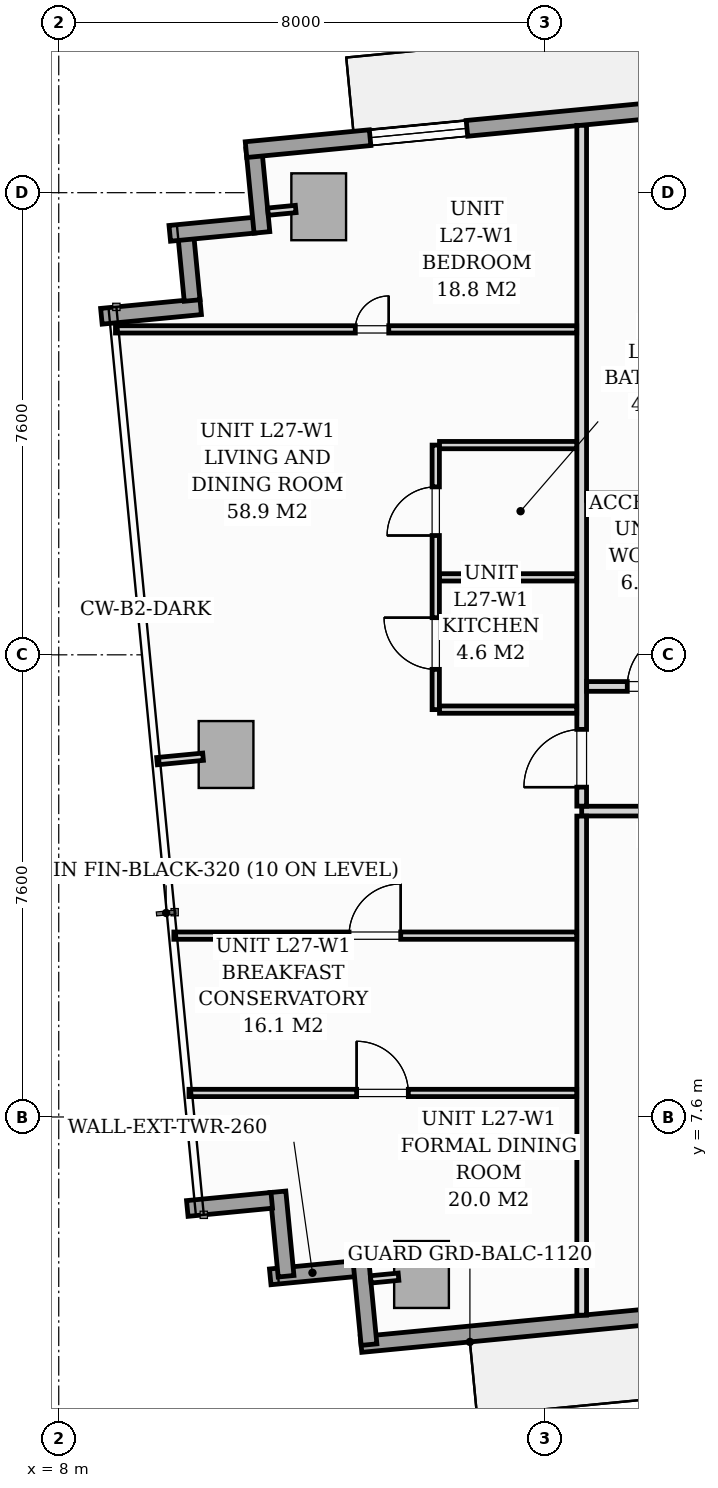
"""IFC4 building model, lengths in metres.
Left out: names, types, materials, properties, quantities, classifications, styles, units other than length and angle.
Written with IfcOpenShell. Run it as: python <this file> out.ifc"""

import sys

from ifc_helpers import new_model, si_unit, direction, frame, frame_2d, origin, origin_2d, place, context, subcontext, project, spatial, rectangle, extrude, source, transform, mapped, element, fill, save


model = new_model("IFC4")
c1 = context("Model", 3, precision=1e-05, world=origin(), true_north=direction((0.0, 1.0)))
c2 = subcontext(c1, "Body", "Model", "MODEL_VIEW")
j1 = project(units=[si_unit("LENGTHUNIT", "METRE"), si_unit("PLANEANGLEUNIT", "RADIAN")], contexts=[c1])
p1 = place(None, origin())
s1 = spatial("IfcSite", under=j1, at=p1, CompositionType="ELEMENT")
p2 = place(p1, origin())
s2 = spatial("IfcBuilding", under=s1, at=p2, CompositionType="ELEMENT")
p3 = place(p2, frame((0.0, 0.0, 97.0)))
s3 = spatial("IfcBuildingStorey", under=s2, at=p3, CompositionType="ELEMENT", Elevation=97.0)
m1 = source(origin(), c2, "Body", "SweptSolid", [
    extrude(rectangle(XDim=0.9, YDim=1.1, at=origin_2d()), origin(), (0.0, 0.0, 1.0), 3.196),
])
for number, where, z_axis, x_axis in (
    (1, (13.966, 5.01, 0.002), (0.0, 0.0, 1.0), (0.995, 0.096, 0.0)),
    (2, (12.275, 22.568, 0.002), (0.0, 0.0, 1.0), (0.995, 0.096, 0.0)),
    (3, (10.752, 13.561, 0.002), (0.0, 0.0, 1.0), (0.995, 0.096, 0.0)),
):
    element("IfcColumn", number, at=place(p3, frame(where, z_axis=z_axis, x_axis=x_axis)), inside=s3, PredefinedType="COLUMN", context=c2, shape_type="MappedRepresentation", body=[
        mapped(m1, transform((0.0, 0.0, 0.0), scale=1.0)),
    ])
for number, where, z_axis, x_axis in (
    (4, (12.867, 5.104, 0.0), (0.0, 0.0, 1.0), (-0.995, -0.096, 0.0)),
    (5, (11.739, 4.981, 0.0), (0.0, 0.0, 1.0), (-0.096, 0.995, 0.0)),
):
    element("IfcWall", number, at=place(p3, frame(where, z_axis=z_axis, x_axis=x_axis)), inside=s3, PredefinedType="STANDARD", context=c2, shape_type="SweptSolid", body=[
        extrude(rectangle(XDim=1.395, YDim=0.26, at=frame_2d((0.697, 0.0))), origin(), (0.0, 0.0, 1.0), 2.94),
    ])
p4 = place(p3, frame((11.503, 6.229, 0.0), z_axis=(0.0, 0.0, 1.0), x_axis=(-0.995391056452, -0.09589913835, 0.0)))
e6 = element("IfcWall", 6, at=p4, inside=s3, PredefinedType="STANDARD", context=c2, shape_type="SweptSolid", body=[
    extrude(rectangle(XDim=1.395, YDim=0.26, at=frame_2d((0.698, 0.0))), origin(), (0.0, 0.0, 1.0), 2.94),
])
p5 = place(p3, frame((8.701, 20.767, 0.0), z_axis=(0.0, 0.0, 1.0), x_axis=(0.995394563142, 0.095862733462, 0.0)))
e7 = element("IfcWall", 7, at=p5, inside=s3, PredefinedType="STANDARD", context=c2, shape_type="SweptSolid", body=[
    extrude(rectangle(XDim=1.64, YDim=0.26, at=frame_2d((0.82, 0.0))), origin(), (0.0, 0.0, 1.0), 2.94),
])
p6 = place(p3, frame((10.193, 21.027, 0.0), z_axis=(0.0, 0.0, 1.0), x_axis=(-0.095740721699, 0.995406306092, 0.0)))
e8 = element("IfcWall", 8, at=p6, inside=s3, PredefinedType="STANDARD", context=c2, shape_type="SweptSolid", body=[
    extrude(rectangle(XDim=1.15, YDim=0.26, at=frame_2d((0.575, 0.0))), origin(), (0.0, 0.0, 1.0), 2.94),
])
p7 = place(p3, frame((9.826, 22.131, 0.0), z_axis=(0.0, 0.0, 1.0), x_axis=(0.995389446633, 0.095915846097, 0.0)))
e9 = element("IfcWall", 9, at=p7, inside=s3, PredefinedType="STANDARD", context=c2, shape_type="SweptSolid", body=[
    extrude(rectangle(XDim=1.395, YDim=0.26, at=frame_2d((0.697, 0.0))), origin(), (0.0, 0.0, 1.0), 2.94),
])
p8 = place(p3, frame((11.341, 22.147, 0.0), z_axis=(0.0, 0.0, 1.0), x_axis=(-0.09589913835, 0.995391056452, 0.0)))
e10 = element("IfcWall", 10, at=p8, inside=s3, PredefinedType="STANDARD", context=c2, shape_type="SweptSolid", body=[
    extrude(rectangle(XDim=1.395, YDim=0.26, at=frame_2d((0.698, 0.0))), origin(), (0.0, 0.0, 1.0), 2.94),
])
p9 = place(p3, frame((11.08, 23.508, 0.0), z_axis=(0.0, 0.0, 1.0), x_axis=(0.995396638587, 0.095841180552, 0.0)))
e11 = element("IfcWall", 11, at=p9, inside=s3, PredefinedType="STANDARD", context=c2, shape_type="SweptSolid", body=[
    extrude(rectangle(XDim=19.11, YDim=0.26, at=frame_2d((9.555, 0.0))), origin(), (0.0, 0.0, 1.0), 2.94),
])
p10 = place(p9, frame((7.726, 0.0, 0.0)))
e12 = element("IfcOpeningElement", 12, at=p10, cuts=e11, PredefinedType="OPENING", context=c2, shape_type="SweptSolid", body=[
    extrude(rectangle(XDim=1.8, YDim=2.06, at=frame_2d((0.9, 1.03))), frame((0.0, 0.14, 0.0), z_axis=(0.0, -1.0, 0.0), x_axis=(1.0, 0.0, 0.0)), (0.0, 0.0, 1.0), 0.28),
])
p11 = place(p9, frame((2.05, 0.0, 0.65)))
e13 = element("IfcOpeningElement", 13, at=p11, cuts=e11, PredefinedType="OPENING", context=c2, shape_type="SweptSolid", body=[
    extrude(rectangle(XDim=1.6, YDim=1.5, at=frame_2d((0.8, 0.75))), frame((0.0, 0.14, 0.0), z_axis=(0.0, -1.0, 0.0), x_axis=(1.0, 0.0, 0.0)), (0.0, 0.0, 1.0), 0.28),
])
p12 = place(p3, frame((31.994, 5.69, 0.0), z_axis=(0.0, 0.0, 1.0), x_axis=(-0.995396521236, -0.095842399342, 0.0)))
e14 = element("IfcWall", 14, at=p12, inside=s3, PredefinedType="STANDARD", context=c2, shape_type="SweptSolid", body=[
    extrude(rectangle(XDim=19.11, YDim=0.26, at=frame_2d((9.555, 0.0))), origin(), (0.0, 0.0, 1.0), 2.94),
])
p13 = place(p12, frame((7.91, 0.0, 0.0)))
e15 = element("IfcOpeningElement", 15, at=p13, cuts=e14, PredefinedType="OPENING", context=c2, shape_type="SweptSolid", body=[
    extrude(rectangle(XDim=1.8, YDim=2.06, at=frame_2d((0.9, 1.03))), frame((0.0, 0.14, 0.0), z_axis=(0.0, -1.0, 0.0), x_axis=(1.0, 0.0, 0.0)), (0.0, 0.0, 1.0), 0.28),
])
p14 = place(p12, frame((0.7, 0.0, 0.65)))
e16 = element("IfcOpeningElement", 16, at=p14, cuts=e14, PredefinedType="OPENING", context=c2, shape_type="SweptSolid", body=[
    extrude(rectangle(XDim=1.6, YDim=1.5, at=frame_2d((0.8, 0.75))), frame((0.0, 0.14, 0.0), z_axis=(0.0, -1.0, 0.0), x_axis=(1.0, 0.0, 0.0)), (0.0, 0.0, 1.0), 0.28),
])
p15 = place(p12, frame((5.167, 0.0, 0.75)))
e17 = element("IfcOpeningElement", 17, at=p15, cuts=e14, PredefinedType="OPENING", context=c2, shape_type="SweptSolid", body=[
    extrude(rectangle(XDim=1.6, YDim=1.5, at=frame_2d((0.8, 0.75))), frame((0.0, 0.14, 0.0), z_axis=(0.0, -1.0, 0.0), x_axis=(1.0, 0.0, 0.0)), (0.0, 0.0, 1.0), 0.28),
])
p16 = place(p3, frame((13.103, 3.856, 0.0), z_axis=(0.0, 0.0, 1.0), x_axis=(-0.09589913835, 0.995391056452, 0.0)))
e18 = element("IfcWall", 18, at=p16, inside=s3, PredefinedType="STANDARD", context=c2, shape_type="SweptSolid", body=[
    extrude(rectangle(XDim=1.395, YDim=0.26, at=frame_2d((0.698, 0.0))), origin(), (0.0, 0.0, 1.0), 2.94),
])
p17 = place(p3, frame((16.6, 12.63, 0.0), z_axis=(0.0, 0.0, 1.0), x_axis=(1.0, 0.0, 0.0)))
e19 = element("IfcWall", 19, at=p17, inside=s3, PredefinedType="PARTITIONING", context=c2, shape_type="SweptSolid", body=[
    extrude(rectangle(XDim=37.6, YDim=0.16, at=frame_2d((18.8, 0.0))), origin(), (0.0, 0.0, 1.0), 2.94),
])
p18 = place(p17, frame((1.626, 0.0, 0.0)))
e20 = element("IfcOpeningElement", 20, at=p18, cuts=e19, PredefinedType="OPENING", context=c2, shape_type="SweptSolid", body=[
    extrude(rectangle(XDim=0.95, YDim=2.06, at=frame_2d((0.475, 1.03))), frame((0.0, 0.09, 0.0), z_axis=(0.0, -1.0, 0.0), x_axis=(1.0, 0.0, 0.0)), (0.0, 0.0, 1.0), 0.18),
])
p19 = place(p17, frame((13.46, 0.0, 0.0)))
e21 = element("IfcOpeningElement", 21, at=p19, cuts=e19, PredefinedType="OPENING", context=c2, shape_type="SweptSolid", body=[
    extrude(rectangle(XDim=0.95, YDim=2.06, at=frame_2d((0.475, 1.03))), frame((0.0, 0.09, 0.0), z_axis=(0.0, -1.0, 0.0), x_axis=(1.0, 0.0, 0.0)), (0.0, 0.0, 1.0), 0.18),
])
p20 = place(p17, frame((26.522, 0.0, 0.0)))
e22 = element("IfcOpeningElement", 22, at=p20, cuts=e19, PredefinedType="OPENING", context=c2, shape_type="SweptSolid", body=[
    extrude(rectangle(XDim=0.95, YDim=2.06, at=frame_2d((0.475, 1.03))), frame((0.0, 0.09, 0.0), z_axis=(0.0, -1.0, 0.0), x_axis=(1.0, 0.0, 0.0)), (0.0, 0.0, 1.0), 0.18),
])
p21 = place(p3, frame((16.6, 4.341, 0.0), z_axis=(0.0, 0.0, 1.0), x_axis=(0.0, 1.0, 0.0)))
e23 = element("IfcWall", 23, at=p21, inside=s3, PredefinedType="PARTITIONING", context=c2, shape_type="SweptSolid", body=[
    extrude(rectangle(XDim=8.207, YDim=0.16, at=frame_2d((4.104, 0.0))), origin(), (0.0, 0.0, 1.0), 2.94),
])
p22 = place(p3, frame((16.6, 12.712, 0.0), z_axis=(0.0, 0.0, 1.0), x_axis=(0.0, 1.0, 0.0)))
e24 = element("IfcWall", 24, at=p22, inside=s3, PredefinedType="PARTITIONING", context=c2, shape_type="SweptSolid", body=[
    extrude(rectangle(XDim=11.195, YDim=0.16, at=frame_2d((5.598, 0.0))), origin(), (0.0, 0.0, 1.0), 2.94),
])
p23 = place(p22, frame((0.312, 0.0, 0.0)))
e25 = element("IfcOpeningElement", 25, at=p23, cuts=e24, PredefinedType="OPENING", context=c2, shape_type="SweptSolid", body=[
    extrude(rectangle(XDim=0.95, YDim=2.06, at=frame_2d((0.475, 1.03))), frame((0.0, 0.09, 0.0), z_axis=(0.0, -1.0, 0.0), x_axis=(1.0, 0.0, 0.0)), (0.0, 0.0, 1.0), 0.18),
])
p24 = place(p3, frame((14.2, 14.299, 0.0), z_axis=(0.0, 0.0, 1.0), x_axis=(0.0, 1.0, 0.0)))
e26 = element("IfcWall", 26, at=p24, inside=s3, PredefinedType="PARTITIONING", context=c2, shape_type="SweptSolid", body=[
    extrude(rectangle(XDim=4.35, YDim=0.12, at=frame_2d((2.175, 0.0))), origin(), (0.0, 0.0, 1.0), 2.94),
])
p25 = place(p24, frame((0.662, 0.0, 0.0)))
e27 = element("IfcOpeningElement", 27, at=p25, cuts=e26, PredefinedType="OPENING", context=c2, shape_type="SweptSolid", body=[
    extrude(rectangle(XDim=0.85, YDim=2.05, at=frame_2d((0.425, 1.025))), frame((0.0, 0.07, 0.0), z_axis=(0.0, -1.0, 0.0), x_axis=(1.0, 0.0, 0.0)), (0.0, 0.0, 1.0), 0.14),
])
p26 = place(p24, frame((2.863, 0.0, 0.0)))
e28 = element("IfcOpeningElement", 28, at=p26, cuts=e26, PredefinedType="OPENING", context=c2, shape_type="SweptSolid", body=[
    extrude(rectangle(XDim=0.8, YDim=2.02, at=frame_2d((0.4, 1.01))), frame((0.0, 0.07, 0.0), z_axis=(0.0, -1.0, 0.0), x_axis=(1.0, 0.0, 0.0)), (0.0, 0.0, 1.0), 0.14),
])
p27 = place(p3, frame((14.262, 16.474, 0.0), z_axis=(0.0, 0.0, 1.0), x_axis=(1.0, 0.0, 0.0)))
e29 = element("IfcWall", 29, at=p27, inside=s3, PredefinedType="PARTITIONING", context=c2, shape_type="SweptSolid", body=[
    extrude(rectangle(XDim=2.256, YDim=0.12, at=frame_2d((1.128, 0.0))), origin(), (0.0, 0.0, 1.0), 2.94),
])
p28 = place(p3, frame((14.262, 14.299, 0.0), z_axis=(0.0, 0.0, 1.0), x_axis=(1.0, 0.0, 0.0)))
e30 = element("IfcWall", 30, at=p28, inside=s3, PredefinedType="PARTITIONING", context=c2, shape_type="SweptSolid", body=[
    extrude(rectangle(XDim=2.256, YDim=0.12, at=frame_2d((1.128, 0.0))), origin(), (0.0, 0.0, 1.0), 2.063),
])
p29 = place(p3, frame((14.262, 18.649, 0.0), z_axis=(0.0, 0.0, 1.0), x_axis=(1.0, 0.0, 0.0)))
e31 = element("IfcWall", 31, at=p29, inside=s3, PredefinedType="PARTITIONING", context=c2, shape_type="SweptSolid", body=[
    extrude(rectangle(XDim=2.256, YDim=0.12, at=frame_2d((1.128, 0.0))), origin(), (0.0, 0.0, 1.0), 2.94),
])
p30 = place(p3, frame((8.933, 20.552, 0.0), z_axis=(0.0, 0.0, 1.0), x_axis=(1.0, 0.0, 0.0)))
e32 = element("IfcWall", 32, at=p30, inside=s3, PredefinedType="PARTITIONING", context=c2, shape_type="SweptSolid", body=[
    extrude(rectangle(XDim=7.585, YDim=0.12, at=frame_2d((3.792, 0.0))), origin(), (0.0, 0.0, 1.0), 2.94),
])
p31 = place(p30, frame((3.944, 0.0, 0.0)))
e33 = element("IfcOpeningElement", 33, at=p31, cuts=e32, PredefinedType="OPENING", context=c2, shape_type="SweptSolid", body=[
    extrude(rectangle(XDim=0.55, YDim=2.0, at=frame_2d((0.275, 1.0))), frame((0.0, 0.07, 0.0), z_axis=(0.0, -1.0, 0.0), x_axis=(1.0, 0.0, 0.0)), (0.0, 0.0, 1.0), 0.14),
])
p32 = place(p3, frame((10.142, 7.995, 0.0), z_axis=(0.0, 0.0, 1.0), x_axis=(1.0, 0.0, 0.0)))
e34 = element("IfcWall", 34, at=p32, inside=s3, PredefinedType="PARTITIONING", context=c2, shape_type="SweptSolid", body=[
    extrude(rectangle(XDim=6.376, YDim=0.12, at=frame_2d((3.188, 0.0))), origin(), (0.0, 0.0, 1.0), 2.94),
])
p33 = place(p32, frame((2.757, 0.0, 0.0)))
e35 = element("IfcOpeningElement", 35, at=p33, cuts=e34, PredefinedType="OPENING", context=c2, shape_type="SweptSolid", body=[
    extrude(rectangle(XDim=0.85, YDim=2.05, at=frame_2d((0.425, 1.025))), frame((0.0, 0.07, 0.0), z_axis=(0.0, -1.0, 0.0), x_axis=(1.0, 0.0, 0.0)), (0.0, 0.0, 1.0), 0.14),
])
p34 = place(p3, frame((9.893, 10.582, 0.0), z_axis=(0.0, 0.0, 1.0), x_axis=(1.0, 0.0, 0.0)))
e36 = element("IfcWall", 36, at=p34, inside=s3, PredefinedType="PARTITIONING", context=c2, shape_type="SweptSolid", body=[
    extrude(rectangle(XDim=6.625, YDim=0.12, at=frame_2d((3.312, 0.0))), origin(), (0.0, 0.0, 1.0), 2.94),
])
p35 = place(p34, frame((2.881, 0.0, 0.0)))
e37 = element("IfcOpeningElement", 37, at=p35, cuts=e36, PredefinedType="OPENING", context=c2, shape_type="SweptSolid", body=[
    extrude(rectangle(XDim=0.85, YDim=2.05, at=frame_2d((0.425, 1.025))), frame((0.0, 0.07, 0.0), z_axis=(0.0, -1.0, 0.0), x_axis=(1.0, 0.0, 0.0)), (0.0, 0.0, 1.0), 0.14),
])
p36 = place(p3, frame((16.682, 14.68, 0.0), z_axis=(0.0, 0.0, 1.0), x_axis=(1.0, 0.0, 0.0)))
e38 = element("IfcWall", 38, at=p36, inside=s3, PredefinedType="PARTITIONING", context=c2, shape_type="SweptSolid", body=[
    extrude(rectangle(XDim=9.478, YDim=0.16, at=frame_2d((4.739, 0.0))), origin(), (0.0, 0.0, 1.0), 2.94),
])
p37 = place(p36, frame((0.668, 0.0, 0.0)))
e39 = element("IfcOpeningElement", 39, at=p37, cuts=e38, PredefinedType="OPENING", context=c2, shape_type="SweptSolid", body=[
    extrude(rectangle(XDim=0.9, YDim=2.05, at=frame_2d((0.45, 1.025))), frame((0.0, 0.09, 0.0), z_axis=(0.0, -1.0, 0.0), x_axis=(1.0, 0.0, 0.0)), (0.0, 0.0, 1.0), 0.18),
])
p38 = place(p36, frame((5.363, 0.0, 0.0)))
e40 = element("IfcOpeningElement", 40, at=p38, cuts=e38, PredefinedType="OPENING", context=c2, shape_type="SweptSolid", body=[
    extrude(rectangle(XDim=0.95, YDim=2.06, at=frame_2d((0.475, 1.03))), frame((0.0, 0.09, 0.0), z_axis=(0.0, -1.0, 0.0), x_axis=(1.0, 0.0, 0.0)), (0.0, 0.0, 1.0), 0.18),
])
p39 = place(p3, frame((16.682, 17.8, 0.0), z_axis=(0.0, 0.0, 1.0), x_axis=(1.0, 0.0, 0.0)))
e41 = element("IfcWall", 41, at=p39, inside=s3, PredefinedType="PARTITIONING", context=c2, shape_type="SweptSolid", body=[
    extrude(rectangle(XDim=2.256, YDim=0.12, at=frame_2d((1.128, 0.0))), origin(), (0.0, 0.0, 1.0), 2.94),
])
for number, where, z_axis, x_axis in (
    (42, (13.588, 4.973, 0.0), (0.0, 0.0, 1.0), (-0.995, -0.095, 0.0)),
    (43, (11.897, 22.532, 0.0), (0.0, 0.0, 1.0), (-0.995, -0.096, 0.0)),
):
    element("IfcWall", number, at=place(p3, frame(where, z_axis=z_axis, x_axis=x_axis)), inside=s3, PredefinedType="PARTITIONING", context=c2, shape_type="SweptSolid", body=[
        extrude(rectangle(XDim=0.458, YDim=0.12, at=frame_2d((0.229, 0.0))), origin(), (0.0, 0.0, 1.0), 2.94),
    ])
p40 = place(p3, frame((10.373, 13.524, 0.0), z_axis=(0.0, 0.0, 1.0), x_axis=(-0.995377786728, -0.096036772582, 0.0)))
e44 = element("IfcWall", 44, at=p40, inside=s3, PredefinedType="PARTITIONING", context=c2, shape_type="SweptSolid", body=[
    extrude(rectangle(XDim=0.76, YDim=0.12, at=frame_2d((0.38, 0.0))), origin(), (0.0, 0.0, 1.0), 2.94),
])
m2 = source(origin(), c2, "Body", "SweptSolid", [
    extrude(rectangle(XDim=1.6, YDim=1.5, at=frame_2d((0.8, 0.75))), frame((0.0, 0.03, 0.0), z_axis=(0.0, -1.0, 0.0), x_axis=(1.0, 0.0, 0.0)), (0.0, 0.0, 1.0), 0.06),
])
p41 = place(p11, origin())
e45 = element("IfcWindow", 45, at=p41, inside=s3, PartitioningType="SINGLE_PANEL", PredefinedType="WINDOW", context=c2, shape_type="MappedRepresentation", body=[
    mapped(m2, transform((0.0, 0.0, 0.0), scale=1.0)),
])
fill(e13, e45)
m3 = source(origin(), c2, "Body", "SweptSolid", [
    extrude(rectangle(XDim=0.95, YDim=2.06, at=frame_2d((0.475, 1.03))), frame((0.0, 0.025, 0.0), z_axis=(0.0, -1.0, 0.0), x_axis=(1.0, 0.0, 0.0)), (0.0, 0.0, 1.0), 0.05),
])
p42 = place(p23, origin())
e46 = element("IfcDoor", 46, at=p42, inside=s3, OperationType="SINGLE_SWING_LEFT", PredefinedType="DOOR", context=c2, shape_type="MappedRepresentation", body=[
    mapped(m3, transform((0.0, 0.0, 0.0), scale=1.0)),
])
fill(e25, e46)
m4 = source(origin(), c2, "Body", "SweptSolid", [
    extrude(rectangle(XDim=0.85, YDim=2.05, at=frame_2d((0.425, 1.025))), frame((0.0, 0.025, 0.0), z_axis=(0.0, -1.0, 0.0), x_axis=(1.0, 0.0, 0.0)), (0.0, 0.0, 1.0), 0.05),
])
p43 = place(p25, origin())
e47 = element("IfcDoor", 47, at=p43, inside=s3, OperationType="SINGLE_SWING_RIGHT", PredefinedType="DOOR", context=c2, shape_type="MappedRepresentation", body=[
    mapped(m4, transform((0.0, 0.0, 0.0), scale=1.0)),
])
fill(e27, e47)
m5 = source(origin(), c2, "Body", "SweptSolid", [
    extrude(rectangle(XDim=0.8, YDim=2.02, at=frame_2d((0.4, 1.01))), frame((0.0, 0.025, 0.0), z_axis=(0.0, -1.0, 0.0), x_axis=(1.0, 0.0, 0.0)), (0.0, 0.0, 1.0), 0.05),
])
p44 = place(p26, origin())
e48 = element("IfcDoor", 48, at=p44, inside=s3, OperationType="SINGLE_SWING_LEFT", PredefinedType="DOOR", context=c2, shape_type="MappedRepresentation", body=[
    mapped(m5, transform((0.0, 0.0, 0.0), scale=1.0)),
])
fill(e28, e48)
m6 = source(origin(), c2, "Body", "SweptSolid", [
    extrude(rectangle(XDim=0.55, YDim=2.0, at=frame_2d((0.275, 1.0))), frame((0.0, 0.025, 0.0), z_axis=(0.0, -1.0, 0.0), x_axis=(1.0, 0.0, 0.0)), (0.0, 0.0, 1.0), 0.05),
])
p45 = place(p31, origin())
e49 = element("IfcDoor", 49, at=p45, inside=s3, OperationType="SINGLE_SWING_RIGHT", PredefinedType="DOOR", context=c2, shape_type="MappedRepresentation", body=[
    mapped(m6, transform((0.0, 0.0, 0.0), scale=1.0)),
])
fill(e33, e49)
p46 = place(p33, origin())
e50 = element("IfcDoor", 50, at=p46, inside=s3, OperationType="SINGLE_SWING_LEFT", PredefinedType="DOOR", context=c2, shape_type="MappedRepresentation", body=[
    mapped(m4, transform((0.0, 0.0, 0.0), scale=1.0)),
])
fill(e35, e50)
p47 = place(p35, origin())
e51 = element("IfcDoor", 51, at=p47, inside=s3, OperationType="SINGLE_SWING_RIGHT", PredefinedType="DOOR", context=c2, shape_type="MappedRepresentation", body=[
    mapped(m4, transform((0.0, 0.0, 0.0), scale=1.0)),
])
fill(e37, e51)
m7 = source(origin(), c2, "Body", "SweptSolid", [
    extrude(rectangle(XDim=0.9, YDim=2.05, at=frame_2d((0.45, 1.025))), frame((0.0, 0.025, 0.0), z_axis=(0.0, -1.0, 0.0), x_axis=(1.0, 0.0, 0.0)), (0.0, 0.0, 1.0), 0.05),
])
p48 = place(p37, origin())
e52 = element("IfcDoor", 52, at=p48, inside=s3, OperationType="SINGLE_SWING_RIGHT", PredefinedType="DOOR", context=c2, shape_type="MappedRepresentation", body=[
    mapped(m7, transform((0.0, 0.0, 0.0), scale=1.0)),
])
fill(e39, e52)
save(model, sys.argv[1])
